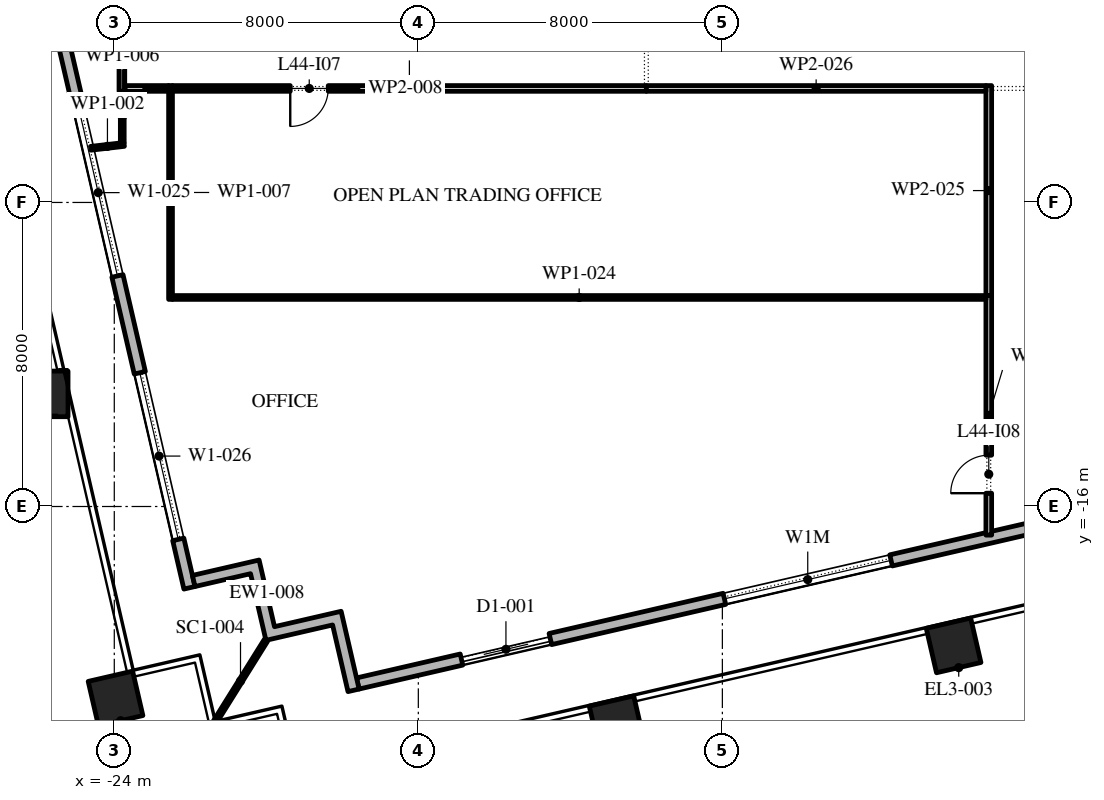
"""IFC4 building model, lengths in metres.
Left out: names, types, materials, properties, quantities, classifications, styles, units other than length and angle.
Written with IfcOpenShell. Run it as: python <this file> out.ifc"""

import sys

from ifc_helpers import new_model, si_unit, direction, frame, frame_2d, origin, origin_2d, place, context, subcontext, project, spatial, polyline, rectangle, outline, extrude, element, fill, save


model = new_model("IFC4")
c1 = context("Model", 3, precision=1e-05, world=origin(), true_north=direction((0.0, 1.0)))
c2 = subcontext(c1, "Body", "Model", "MODEL_VIEW")
j1 = project(units=[si_unit("LENGTHUNIT", "METRE"), si_unit("PLANEANGLEUNIT", "RADIAN")], contexts=[c1])
p1 = place(None, origin())
s1 = spatial("IfcSite", under=j1, at=p1, CompositionType="ELEMENT")
p2 = place(p1, origin())
s2 = spatial("IfcBuilding", under=s1, at=p2, CompositionType="ELEMENT")
p3 = place(p2, frame((0.0, 0.0, 201.0)))
s3 = spatial("IfcBuildingStorey", under=s2, at=p3, CompositionType="ELEMENT", Elevation=201.0)
for number, where, z_axis, x_axis in (
    (1, (-10.782, -21.702, 0.0), (0.0, 0.0, 1.0), (0.974, 0.225, 0.0)),
    (2, (-1.916, -19.655, 0.0), (0.0, 0.0, 1.0), (0.974, 0.225, 0.0)),
):
    element("IfcColumn", number, at=place(p3, frame(where, z_axis=z_axis, x_axis=x_axis)), inside=s3, PredefinedType="COLUMN", context=c2, shape_type="SweptSolid", body=[
        extrude(rectangle(XDim=1.2, YDim=1.2, at=origin_2d()), origin(), (0.0, 0.0, 1.0), 4.2),
    ])
p4 = place(p3, frame((-25.817, -13.037, 0.0), z_axis=(-0.00267376016, 0.011683169396, 0.9999281747), x_axis=(-0.974798272484, -0.223088161862, 0.0)))
e3 = element("IfcColumn", 3, at=p4, inside=s3, PredefinedType="COLUMN", context=c2, shape_type="SweptSolid", body=[
    extrude(rectangle(XDim=1.2, YDim=1.2, at=origin_2d()), origin(), (0.0, 0.0, 1.0), 4.2),
])
p5 = place(p3, frame((-23.967, -21.051, 0.0), z_axis=(0.0, 0.0, 1.0), x_axis=(0.974370064785, 0.224951054344, 0.0)))
e4 = element("IfcColumn", 4, at=p5, inside=s3, PredefinedType="COLUMN", context=c2, shape_type="SweptSolid", body=[
    extrude(rectangle(XDim=1.2, YDim=1.2, at=origin_2d()), origin(), (0.0, 0.0, 1.0), 4.2),
])
p6 = place(p3, frame((-17.592, -20.657, 0.0), z_axis=(0.0, 0.0, 1.0), x_axis=(0.974370243697, 0.224950279389, 0.0)))
e5 = element("IfcWall", 5, at=p6, inside=s3, PredefinedType="STANDARD", context=c2, shape_type="SweptSolid", body=[
    extrude(rectangle(XDim=49.5, YDim=0.3, at=frame_2d((24.75, 0.0))), origin(), (0.0, 0.0, 1.0), 4.0),
])
p7 = place(p6, frame((2.8, 0.0, 0.0)))
e6 = element("IfcOpeningElement", 6, at=p7, cuts=e5, PredefinedType="OPENING", context=c2, shape_type="SweptSolid", body=[
    extrude(rectangle(XDim=2.4, YDim=3.5, at=frame_2d((1.2, 1.75))), frame((0.0, 0.16, 0.0), z_axis=(0.0, -1.0, 0.0), x_axis=(1.0, 0.0, 0.0)), (0.0, 0.0, 1.0), 0.32),
])
p8 = place(p6, frame((9.9, 0.0, 0.45)))
e7 = element("IfcOpeningElement", 7, at=p8, cuts=e5, PredefinedType="OPENING", context=c2, shape_type="SweptSolid", body=[
    extrude(rectangle(XDim=4.5, YDim=2.575, at=frame_2d((2.25, 1.288))), frame((0.0, 0.16, 0.0), z_axis=(0.0, -1.0, 0.0), x_axis=(1.0, 0.0, 0.0)), (0.0, 0.0, 1.0), 0.32),
])
p9 = place(p6, frame((18.2, 0.0, 0.45)))
e8 = element("IfcOpeningElement", 8, at=p9, cuts=e5, PredefinedType="OPENING", context=c2, shape_type="SweptSolid", body=[
    extrude(rectangle(XDim=4.5, YDim=3.05, at=frame_2d((2.25, 1.525))), frame((0.0, 0.16, 0.0), z_axis=(0.0, -1.0, 0.0), x_axis=(1.0, 0.0, 0.0)), (0.0, 0.0, 1.0), 0.32),
])
p10 = place(p6, frame((26.5, 0.0, 0.45)))
e9 = element("IfcOpeningElement", 9, at=p10, cuts=e5, PredefinedType="OPENING", context=c2, shape_type="SweptSolid", body=[
    extrude(rectangle(XDim=4.5, YDim=2.75, at=frame_2d((2.25, 1.375))), frame((0.0, 0.16, 0.0), z_axis=(0.0, -1.0, 0.0), x_axis=(1.0, 0.0, 0.0)), (0.0, 0.0, 1.0), 0.32),
])
p11 = place(p6, frame((36.8, 0.0, 0.0)))
e10 = element("IfcOpeningElement", 10, at=p11, cuts=e5, PredefinedType="OPENING", context=c2, shape_type="SweptSolid", body=[
    extrude(rectangle(XDim=2.4, YDim=3.275, at=frame_2d((1.2, 1.637))), frame((0.0, 0.16, 0.0), z_axis=(0.0, -1.0, 0.0), x_axis=(1.0, 0.0, 0.0)), (0.0, 0.0, 1.0), 0.32),
])
p12 = place(p6, frame((43.1, 0.0, 0.45)))
e11 = element("IfcOpeningElement", 11, at=p12, cuts=e5, PredefinedType="OPENING", context=c2, shape_type="SweptSolid", body=[
    extrude(rectangle(XDim=4.5, YDim=2.875, at=frame_2d((2.25, 1.438))), frame((0.0, 0.16, 0.0), z_axis=(0.0, -1.0, 0.0), x_axis=(1.0, 0.0, 0.0)), (0.0, 0.0, 1.0), 0.32),
])
p13 = place(p3, frame((-33.157, 30.092, 0.0), z_axis=(0.0, 0.0, 1.0), x_axis=(0.224950279389, -0.974370243697, 0.0)))
e12 = element("IfcWall", 12, at=p13, inside=s3, PredefinedType="STANDARD", context=c2, shape_type="SweptSolid", body=[
    extrude(rectangle(XDim=49.5, YDim=0.3, at=frame_2d((24.75, 0.0))), origin(), (0.0, 0.0, 1.0), 4.0),
])
p14 = place(p13, frame((2.207, 0.0, 0.0)))
e13 = element("IfcOpeningElement", 13, at=p14, cuts=e12, PredefinedType="OPENING", context=c2, shape_type="SweptSolid", body=[
    extrude(rectangle(XDim=2.4, YDim=3.5, at=frame_2d((1.2, 1.75))), frame((0.0, 0.16, 0.0), z_axis=(0.0, -1.0, 0.0), x_axis=(1.0, 0.0, 0.0)), (0.0, 0.0, 1.0), 0.32),
])
p15 = place(p13, frame((8.121, 0.0, 0.45)))
e14 = element("IfcOpeningElement", 14, at=p15, cuts=e12, PredefinedType="OPENING", context=c2, shape_type="SweptSolid", body=[
    extrude(rectangle(XDim=4.5, YDim=2.825, at=frame_2d((2.25, 1.413))), frame((0.0, 0.16, 0.0), z_axis=(0.0, -1.0, 0.0), x_axis=(1.0, 0.0, 0.0)), (0.0, 0.0, 1.0), 0.32),
])
p16 = place(p13, frame((15.236, 0.0, 0.45)))
e15 = element("IfcOpeningElement", 15, at=p16, cuts=e12, PredefinedType="OPENING", context=c2, shape_type="SweptSolid", body=[
    extrude(rectangle(XDim=4.5, YDim=2.95, at=frame_2d((2.25, 1.475))), frame((0.0, 0.16, 0.0), z_axis=(0.0, -1.0, 0.0), x_axis=(1.0, 0.0, 0.0)), (0.0, 0.0, 1.0), 0.32),
])
p17 = place(p13, frame((22.35, 0.0, 0.45)))
e16 = element("IfcOpeningElement", 16, at=p17, cuts=e12, PredefinedType="OPENING", context=c2, shape_type="SweptSolid", body=[
    extrude(rectangle(XDim=4.5, YDim=3.0, at=frame_2d((2.25, 1.5))), frame((0.0, 0.16, 0.0), z_axis=(0.0, -1.0, 0.0), x_axis=(1.0, 0.0, 0.0)), (0.0, 0.0, 1.0), 0.32),
])
p18 = place(p13, frame((30.514, 0.0, 0.0)))
e17 = element("IfcOpeningElement", 17, at=p18, cuts=e12, PredefinedType="OPENING", context=c2, shape_type="SweptSolid", body=[
    extrude(rectangle(XDim=2.4, YDim=3.5, at=frame_2d((1.2, 1.75))), frame((0.0, 0.16, 0.0), z_axis=(0.0, -1.0, 0.0), x_axis=(1.0, 0.0, 0.0)), (0.0, 0.0, 1.0), 0.32),
])
p19 = place(p13, frame((36.579, 0.0, 0.45)))
e18 = element("IfcOpeningElement", 18, at=p19, cuts=e12, PredefinedType="OPENING", context=c2, shape_type="SweptSolid", body=[
    extrude(rectangle(XDim=4.5, YDim=3.05, at=frame_2d((2.25, 1.525))), frame((0.0, 0.16, 0.0), z_axis=(0.0, -1.0, 0.0), x_axis=(1.0, 0.0, 0.0)), (0.0, 0.0, 1.0), 0.32),
])
p20 = place(p13, frame((43.693, 0.0, 0.45)))
e19 = element("IfcOpeningElement", 19, at=p20, cuts=e12, PredefinedType="OPENING", context=c2, shape_type="SweptSolid", body=[
    extrude(rectangle(XDim=4.5, YDim=3.05, at=frame_2d((2.25, 1.525))), frame((0.0, 0.16, 0.0), z_axis=(0.0, -1.0, 0.0), x_axis=(1.0, 0.0, 0.0)), (0.0, 0.0, 1.0), 0.32),
])
p21 = place(p3, origin())
e20 = element("IfcWall", 20, at=p21, inside=s3, PredefinedType="STANDARD", context=c2, shape_type="SweptSolid", body=[
    extrude(outline(polyline([(-18.256, -19.117), (-20.01, -19.522), (-20.414, -17.768), (-21.876, -18.105), (-21.943, -17.813), (-20.19, -17.408), (-19.785, -19.162), (-18.031, -18.757), (-17.558, -20.803), (-17.851, -20.871), (-18.256, -19.117)])), origin(), (0.0, 0.0, 1.0), 4.0),
])
p22 = place(p3, frame((-20.01, -19.522, -0.05), z_axis=(0.0, 0.0, 1.0), x_axis=(-0.529920736377, -0.848047176257, 0.0)))
e21 = element("IfcWall", 21, at=p22, inside=s3, PredefinedType="STANDARD", context=c2, shape_type="SweptSolid", body=[
    extrude(rectangle(XDim=2.526, YDim=0.1, at=frame_2d((1.263, 0.0))), origin(), (0.0, 0.0, 1.0), 4.05),
])
p23 = place(p3, frame((-24.62, -6.575, 0.0), z_axis=(0.0, 0.0, 1.0), x_axis=(0.993501545499, 0.113818623659, 0.0)))
e22 = element("IfcWall", 22, at=p23, inside=s3, PredefinedType="PARTITIONING", context=c2, shape_type="SweptSolid", body=[
    extrude(rectangle(XDim=0.886, YDim=0.1, at=frame_2d((0.443, 0.0))), origin(), (0.0, 0.0, 1.0), 4.0),
])
p24 = place(p3, frame((-23.8, -5.075, 0.0), z_axis=(0.0, 0.0, 1.0), x_axis=(0.0, 1.0, 0.0)))
e23 = element("IfcWall", 23, at=p24, inside=s3, PredefinedType="PARTITIONING", context=c2, shape_type="SweptSolid", body=[
    extrude(rectangle(XDim=27.335, YDim=0.15, at=frame_2d((13.667, 0.0))), origin(), (0.0, 0.0, 1.0), 4.0),
])
p25 = place(p24, frame((15.985, 0.0, 0.0)))
e24 = element("IfcOpeningElement", 24, at=p25, cuts=e23, PredefinedType="OPENING", context=c2, shape_type="SweptSolid", body=[
    extrude(rectangle(XDim=1.0, YDim=2.1, at=frame_2d((0.5, 1.05))), frame((0.0, 0.085, 0.0), z_axis=(0.0, -1.0, 0.0), x_axis=(1.0, 0.0, 0.0)), (0.0, 0.0, 1.0), 0.17),
])
p26 = place(p3, frame((-23.79, -5.075, 0.0), z_axis=(0.0, 0.0, 1.0), x_axis=(0.0, -1.0, 0.0)))
e25 = element("IfcWall", 25, at=p26, inside=s3, PredefinedType="PARTITIONING", context=c2, shape_type="SweptSolid", body=[
    extrude(rectangle(XDim=1.355, YDim=0.1, at=frame_2d((0.677, 0.0))), origin(), (0.0, 0.0, 1.0), 4.0),
])
p27 = place(p3, frame((-22.52, -10.55, 0.0), z_axis=(0.0, 0.0, 1.0), x_axis=(0.0, 1.0, 0.0)))
e26 = element("IfcWall", 26, at=p27, inside=s3, PredefinedType="PARTITIONING", context=c2, shape_type="SweptSolid", body=[
    extrude(rectangle(XDim=5.625, YDim=0.1, at=frame_2d((2.812, 0.0))), origin(), (0.0, 0.0, 1.0), 4.0),
])
p28 = place(p3, frame((-22.57, -5.0, 0.0), z_axis=(0.0, 0.0, 1.0), x_axis=(-1.0, 0.0, 0.0)))
e27 = element("IfcWall", 27, at=p28, inside=s3, PredefinedType="PARTITIONING", context=c2, shape_type="SweptSolid", body=[
    extrude(rectangle(XDim=1.145, YDim=0.15, at=frame_2d((0.573, 0.0))), origin(), (0.0, 0.0, 1.0), 4.0),
])
p29 = place(p3, frame((-10.0, -5.0, 0.0), z_axis=(0.0, 0.0, 1.0), x_axis=(-1.0, 0.0, 0.0)))
e28 = element("IfcWall", 28, at=p29, inside=s3, PredefinedType="PARTITIONING", context=c2, shape_type="SweptSolid", body=[
    extrude(rectangle(XDim=12.47, YDim=0.15, at=frame_2d((6.235, 0.0))), origin(), (0.0, 0.0, 1.0), 4.0),
])
p30 = place(p29, frame((8.37, 0.0, 0.0)))
e29 = element("IfcOpeningElement", 29, at=p30, cuts=e28, PredefinedType="OPENING", context=c2, shape_type="SweptSolid", body=[
    extrude(rectangle(XDim=1.0, YDim=2.1, at=frame_2d((0.5, 1.05))), frame((0.0, 0.085, 0.0), z_axis=(0.0, -1.0, 0.0), x_axis=(1.0, 0.0, 0.0)), (0.0, 0.0, 1.0), 0.17),
])
p31 = place(p3, frame((-0.99, -16.753, 0.0), z_axis=(0.0, 0.0, 1.0), x_axis=(0.0, 1.0, 0.0)))
e30 = element("IfcWall", 30, at=p31, inside=s3, PredefinedType="PARTITIONING", context=c2, shape_type="SweptSolid", body=[
    extrude(rectangle(XDim=6.303, YDim=0.15, at=frame_2d((3.151, 0.0))), origin(), (0.0, 0.0, 1.0), 4.0),
])
p32 = place(p31, frame((1.103, 0.0, 0.0)))
e31 = element("IfcOpeningElement", 31, at=p32, cuts=e30, PredefinedType="OPENING", context=c2, shape_type="SweptSolid", body=[
    extrude(rectangle(XDim=1.0, YDim=2.1, at=frame_2d((0.5, 1.05))), frame((0.0, 0.085, 0.0), z_axis=(0.0, -1.0, 0.0), x_axis=(1.0, 0.0, 0.0)), (0.0, 0.0, 1.0), 0.17),
])
p33 = place(p3, frame((-1.065, -10.5, 0.0), z_axis=(0.0, 0.0, 1.0), x_axis=(-1.0, 0.0, 0.0)))
e32 = element("IfcWall", 32, at=p33, inside=s3, PredefinedType="PARTITIONING", context=c2, shape_type="SweptSolid", body=[
    extrude(rectangle(XDim=21.405, YDim=0.1, at=frame_2d((10.703, 0.0))), origin(), (0.0, 0.0, 1.0), 4.0),
])
p34 = place(p3, frame((-0.99, -10.45, 0.0), z_axis=(0.0, 0.0, 1.0), x_axis=(0.0, 1.0, 0.0)))
e33 = element("IfcWall", 33, at=p34, inside=s3, PredefinedType="PARTITIONING", context=c2, shape_type="SweptSolid", body=[
    extrude(rectangle(XDim=5.525, YDim=0.15, at=frame_2d((2.762, 0.0))), origin(), (0.0, 0.0, 1.0), 4.0),
])
p35 = place(p3, frame((-1.065, -5.0, 0.0), z_axis=(0.0, 0.0, 1.0), x_axis=(-1.0, 0.0, 0.0)))
e34 = element("IfcWall", 34, at=p35, inside=s3, PredefinedType="PARTITIONING", context=c2, shape_type="SweptSolid", body=[
    extrude(rectangle(XDim=8.935, YDim=0.15, at=frame_2d((4.468, 0.0))), origin(), (0.0, 0.0, 1.0), 4.0),
])
p36 = place(p7, origin())
e35 = element("IfcDoor", 35, at=p36, inside=s3, OperationType="DOUBLE_DOOR_SLIDING", PredefinedType="DOOR", context=c2, shape_type="SweptSolid", body=[
    extrude(rectangle(XDim=2.4, YDim=3.5, at=frame_2d((1.2, 1.75))), frame((0.0, 0.025, 0.0), z_axis=(0.0, -1.0, 0.0), x_axis=(1.0, 0.0, 0.0)), (0.0, 0.0, 1.0), 0.05),
])
fill(e6, e35)
p37 = place(p8, origin())
e36 = element("IfcWindow", 36, at=p37, inside=s3, PartitioningType="DOUBLE_PANEL_VERTICAL", PredefinedType="WINDOW", context=c2, shape_type="SweptSolid", body=[
    extrude(rectangle(XDim=4.5, YDim=2.575, at=frame_2d((2.25, 1.288))), frame((0.0, 0.03, 0.0), z_axis=(0.0, -1.0, 0.0), x_axis=(1.0, 0.0, 0.0)), (0.0, 0.0, 1.0), 0.06),
])
fill(e7, e36)
p38 = place(p19, origin())
e37 = element("IfcWindow", 37, at=p38, inside=s3, PartitioningType="DOUBLE_PANEL_VERTICAL", PredefinedType="WINDOW", context=c2, shape_type="SweptSolid", body=[
    extrude(rectangle(XDim=4.5, YDim=3.05, at=frame_2d((2.25, 1.525))), frame((0.0, 0.03, 0.0), z_axis=(0.0, -1.0, 0.0), x_axis=(1.0, 0.0, 0.0)), (0.0, 0.0, 1.0), 0.06),
])
fill(e18, e37)
p39 = place(p20, origin())
e38 = element("IfcWindow", 38, at=p39, inside=s3, PartitioningType="DOUBLE_PANEL_VERTICAL", PredefinedType="WINDOW", context=c2, shape_type="SweptSolid", body=[
    extrude(rectangle(XDim=4.5, YDim=3.05, at=frame_2d((2.25, 1.525))), frame((0.0, 0.03, 0.0), z_axis=(0.0, -1.0, 0.0), x_axis=(1.0, 0.0, 0.0)), (0.0, 0.0, 1.0), 0.06),
])
fill(e19, e38)
p40 = place(p30, origin())
e39 = element("IfcDoor", 39, at=p40, inside=s3, OperationType="SINGLE_SWING_LEFT", PredefinedType="DOOR", context=c2, shape_type="SweptSolid", body=[
    extrude(rectangle(XDim=1.0, YDim=2.1, at=frame_2d((0.5, 1.05))), frame((0.0, 0.025, 0.0), z_axis=(0.0, -1.0, 0.0), x_axis=(1.0, 0.0, 0.0)), (0.0, 0.0, 1.0), 0.05),
])
fill(e29, e39)
p41 = place(p32, origin())
e40 = element("IfcDoor", 40, at=p41, inside=s3, OperationType="SINGLE_SWING_RIGHT", PredefinedType="DOOR", context=c2, shape_type="SweptSolid", body=[
    extrude(rectangle(XDim=1.0, YDim=2.1, at=frame_2d((0.5, 1.05))), frame((0.0, 0.025, 0.0), z_axis=(0.0, -1.0, 0.0), x_axis=(1.0, 0.0, 0.0)), (0.0, 0.0, 1.0), 0.05),
])
fill(e31, e40)
save(model, sys.argv[1])
